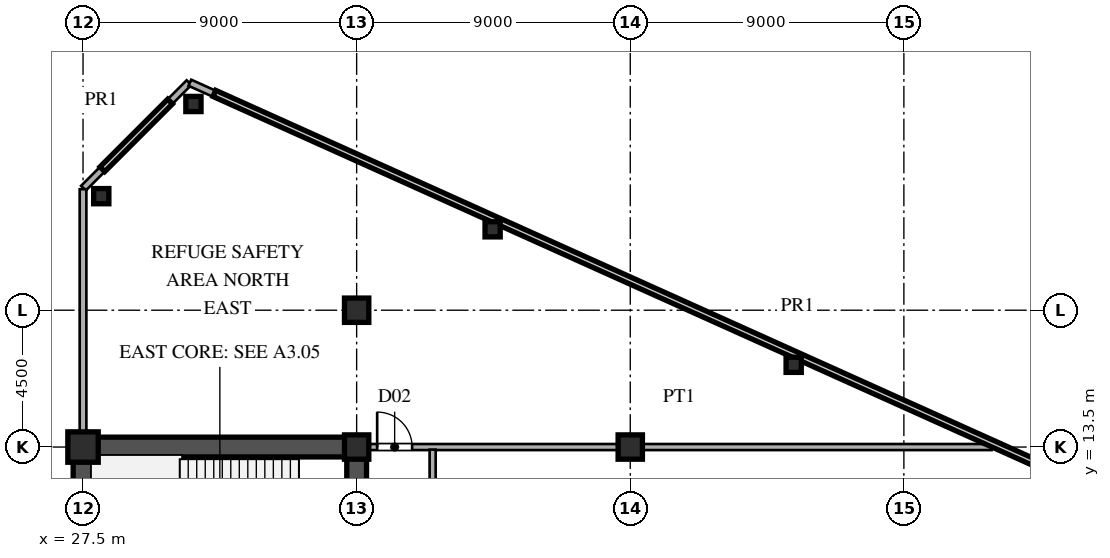
"""IFC4 building model, lengths in metres.
Left out: names, types, materials, properties, quantities, classifications, styles, units other than length and angle.
Written with IfcOpenShell. Run it as: python <this file> out.ifc"""

import sys

from ifc_helpers import new_model, si_unit, direction, frame, frame_2d, origin, origin_2d, place, context, subcontext, project, spatial, rectangle, hollow_rectangle, i_section, extrude, source, transform, mapped, element, fill, save


model = new_model("IFC4")
c1 = context("Model", 3, precision=1e-05, world=origin(), true_north=direction((0.0, 1.0)))
c2 = subcontext(c1, "Body", "Model", "MODEL_VIEW")
j1 = project(units=[si_unit("LENGTHUNIT", "METRE"), si_unit("PLANEANGLEUNIT", "RADIAN")], contexts=[c1])
p1 = place(None, origin())
s1 = spatial("IfcSite", under=j1, at=p1, CompositionType="ELEMENT")
p2 = place(p1, origin())
s2 = spatial("IfcBuilding", under=s1, at=p2, CompositionType="ELEMENT")
p3 = place(p2, frame((0.0, 0.0, 87.3)))
s3 = spatial("IfcBuildingStorey", under=s2, at=p3, CompositionType="ELEMENT", Elevation=87.3)
m1 = source(origin(), c2, "Body", "SweptSolid", [
    extrude(hollow_rectangle(XDim=1.0, YDim=1.0, WallThickness=0.042, at=origin_2d()), origin(), (0.0, 0.0, 1.0), 5.1),
])
p4 = place(p3, frame((27.5, 13.5, 0.0), z_axis=(0.0, 0.0, 1.0), x_axis=(1.0, 0.0, 0.0)))
e1 = element("IfcColumn", 1, at=p4, inside=s3, PredefinedType="COLUMN", context=c2, shape_type="MappedRepresentation", body=[
    mapped(m1, transform((0.0, 0.0, 0.0), scale=1.0)),
])
m2 = source(origin(), c2, "Body", "SweptSolid", [
    extrude(i_section(OverallWidth=0.8, OverallDepth=0.8, WebThickness=0.032, FlangeThickness=0.05, at=origin_2d()), origin(), (0.0, 0.0, 1.0), 5.1),
])
for number, where, z_axis, x_axis in (
    (2, (36.5, 13.5, 0.0), (0.0, 0.0, 1.0), (1.0, 0.0, 0.0)),
    (3, (36.5, 18.0, 0.0), (0.0, 0.0, 1.0), (1.0, 0.0, 0.0)),
    (4, (45.5, 13.5, 0.0), (0.0, 0.0, 1.0), (1.0, 0.0, 0.0)),
):
    element("IfcColumn", number, at=place(p3, frame(where, z_axis=z_axis, x_axis=x_axis)), inside=s3, PredefinedType="COLUMN", context=c2, shape_type="MappedRepresentation", body=[
        mapped(m2, transform((0.0, 0.0, 0.0), scale=1.0)),
    ])
m3 = source(origin(), c2, "Body", "SweptSolid", [
    extrude(hollow_rectangle(XDim=0.5, YDim=0.5, WallThickness=0.02, at=origin_2d()), origin(), (0.0, 0.0, 1.0), 5.1),
])
for number, where, z_axis, x_axis in (
    (5, (31.131, 24.783, 0.0), (0.0, 0.0, 1.0), (1.0, 0.0, 0.0)),
    (6, (28.1, 21.751, 0.0), (0.0, 0.0, 1.0), (1.0, 0.0, 0.0)),
    (7, (40.973, 20.661, 0.0), (0.0, 0.0, 1.0), (1.0, 0.0, 0.0)),
    (8, (50.875, 16.205, 0.0), (0.0, 0.0, 1.0), (1.0, 0.0, 0.0)),
):
    element("IfcColumn", number, at=place(p3, frame(where, z_axis=z_axis, x_axis=x_axis)), inside=s3, PredefinedType="COLUMN", context=c2, shape_type="MappedRepresentation", body=[
        mapped(m3, transform((0.0, 0.0, 0.0), scale=1.0)),
    ])
p5 = place(p3, frame((70.982, 7.508, 0.0), z_axis=(0.0, 0.0, 1.0), x_axis=(-0.911922547569, 0.410362360889, 0.0)))
e9 = element("IfcWall", 9, at=p5, inside=s3, PredefinedType="PARAPET", context=c2, shape_type="SweptSolid", body=[
    extrude(rectangle(XDim=43.823, YDim=0.22, at=frame_2d((21.912, 0.0))), origin(), (0.0, 0.0, 1.0), 1.25),
])
p6 = place(p3, frame((30.986, 25.486, 0.0), z_axis=(0.0, 0.0, 1.0), x_axis=(-0.707106781187, -0.707106781187, 0.0)))
e10 = element("IfcWall", 10, at=p6, inside=s3, PredefinedType="PARAPET", context=c2, shape_type="SweptSolid", body=[
    extrude(rectangle(XDim=4.91, YDim=0.22, at=frame_2d((2.455, 0.0))), origin(), (0.0, 0.0, 1.0), 1.25),
])
p7 = place(p3, frame((27.5, 13.52, 0.0), z_axis=(0.0, 0.0, 1.0), x_axis=(0.0, 1.0, 0.0)))
e11 = element("IfcWall", 11, at=p7, inside=s3, PredefinedType="PARAPET", context=c2, shape_type="SweptSolid", body=[
    extrude(rectangle(XDim=8.46, YDim=0.22, at=frame_2d((4.23, 0.0))), origin(), (0.0, 0.0, 1.0), 1.25),
])
p8 = place(p3, frame((27.5, 1.3, 0.0), z_axis=(0.0, 0.0, 1.0), x_axis=(0.0, 1.0, 0.0)))
e12 = element("IfcWall", 12, at=p8, inside=s3, PredefinedType="SHEAR", context=c2, shape_type="SweptSolid", body=[
    extrude(rectangle(XDim=12.2, YDim=0.65, at=frame_2d((6.1, 0.0))), origin(), (0.0, 0.0, 1.0), 4.88),
])
p9 = place(p3, frame((27.5, 13.5, 0.0), z_axis=(0.0, 0.0, 1.0), x_axis=(1.0, 0.0, 0.0)))
e13 = element("IfcWall", 13, at=p9, inside=s3, PredefinedType="SHEAR", context=c2, shape_type="SweptSolid", body=[
    extrude(rectangle(XDim=9.0, YDim=0.65, at=frame_2d((4.5, 0.0))), origin(), (0.0, 0.0, 1.0), 4.88),
])
p10 = place(p3, frame((36.5, 8.2, 0.0), z_axis=(0.0, 0.0, 1.0), x_axis=(0.0, 1.0, 0.0)))
e14 = element("IfcWall", 14, at=p10, inside=s3, PredefinedType="SHEAR", context=c2, shape_type="SweptSolid", body=[
    extrude(rectangle(XDim=5.45, YDim=0.65, at=frame_2d((2.725, 0.0))), origin(), (0.0, 0.0, 1.0), 4.88),
])
p11 = place(p10, frame((0.245, 0.0, 0.0)))
e15 = element("IfcOpeningElement", 15, at=p11, cuts=e14, PredefinedType="OPENING", context=c2, shape_type="SweptSolid", body=[
    extrude(rectangle(XDim=0.95, YDim=2.15, at=frame_2d((0.475, 1.075))), frame((0.0, 0.335, 0.0), z_axis=(0.0, -1.0, 0.0), x_axis=(1.0, 0.0, 0.0)), (0.0, 0.0, 1.0), 0.67),
])
p12 = place(p3, frame((36.83, 13.5, 0.0), z_axis=(0.0, 0.0, 1.0), x_axis=(1.0, 0.0, 0.0)))
e16 = element("IfcWall", 16, at=p12, inside=s3, PredefinedType="PARTITIONING", context=c2, shape_type="SweptSolid", body=[
    extrude(rectangle(XDim=8.69, YDim=0.2, at=frame_2d((4.345, 0.0))), origin(), (0.0, 0.0, 1.0), 4.18),
])
p13 = place(p12, frame((0.345, 0.0, 0.0)))
e17 = element("IfcOpeningElement", 17, at=p13, cuts=e16, PredefinedType="OPENING", context=c2, shape_type="SweptSolid", body=[
    extrude(rectangle(XDim=1.15, YDim=2.2, at=frame_2d((0.575, 1.1))), frame((0.0, 0.11, 0.0), z_axis=(0.0, -1.0, 0.0), x_axis=(1.0, 0.0, 0.0)), (0.0, 0.0, 1.0), 0.22),
])
p14 = place(p3, frame((45.52, 13.5, 0.0), z_axis=(0.0, 0.0, 1.0), x_axis=(1.0, 0.0, 0.0)))
e18 = element("IfcWall", 18, at=p14, inside=s3, PredefinedType="PARTITIONING", context=c2, shape_type="SweptSolid", body=[
    extrude(rectangle(XDim=11.866, YDim=0.2, at=frame_2d((5.933, 0.0))), origin(), (0.0, 0.0, 1.0), 4.88),
])
p15 = place(p3, frame((39.0, -13.415, 0.0), z_axis=(0.0, 0.0, 1.0), x_axis=(0.0, 1.0, 0.0)))
e19 = element("IfcWall", 19, at=p15, inside=s3, PredefinedType="PARTITIONING", context=c2, shape_type="SweptSolid", body=[
    extrude(rectangle(XDim=26.83, YDim=0.2, at=frame_2d((13.415, 0.0))), origin(), (0.0, 0.0, 1.0), 4.88),
])
p16 = place(p15, frame((4.04, 0.0, 0.0)))
e20 = element("IfcOpeningElement", 20, at=p16, cuts=e19, PredefinedType="OPENING", context=c2, shape_type="SweptSolid", body=[
    extrude(rectangle(XDim=1.15, YDim=2.2, at=frame_2d((0.575, 1.1))), frame((0.0, 0.11, 0.0), z_axis=(0.0, -1.0, 0.0), x_axis=(1.0, 0.0, 0.0)), (0.0, 0.0, 1.0), 0.22),
])
p17 = place(p15, frame((11.34, 0.0, 0.0)))
e21 = element("IfcOpeningElement", 21, at=p17, cuts=e19, PredefinedType="OPENING", context=c2, shape_type="SweptSolid", body=[
    extrude(rectangle(XDim=1.15, YDim=2.2, at=frame_2d((0.575, 1.1))), frame((0.0, 0.11, 0.0), z_axis=(0.0, -1.0, 0.0), x_axis=(1.0, 0.0, 0.0)), (0.0, 0.0, 1.0), 0.22),
])
p18 = place(p15, frame((17.59, 0.0, 0.0)))
e22 = element("IfcOpeningElement", 22, at=p18, cuts=e19, PredefinedType="OPENING", context=c2, shape_type="SweptSolid", body=[
    extrude(rectangle(XDim=1.15, YDim=2.2, at=frame_2d((0.575, 1.1))), frame((0.0, 0.11, 0.0), z_axis=(0.0, -1.0, 0.0), x_axis=(1.0, 0.0, 0.0)), (0.0, 0.0, 1.0), 0.22),
])
p19 = place(p15, frame((23.39, 0.0, 0.0)))
e23 = element("IfcOpeningElement", 23, at=p19, cuts=e19, PredefinedType="OPENING", context=c2, shape_type="SweptSolid", body=[
    extrude(rectangle(XDim=1.15, YDim=2.2, at=frame_2d((0.575, 1.1))), frame((0.0, 0.11, 0.0), z_axis=(0.0, -1.0, 0.0), x_axis=(1.0, 0.0, 0.0)), (0.0, 0.0, 1.0), 0.22),
])
m4 = source(origin(), c2, "Body", "SweptSolid", [
    extrude(rectangle(XDim=1.15, YDim=2.2, at=frame_2d((0.575, 1.1))), frame((0.0, 0.025, 0.0), z_axis=(0.0, -1.0, 0.0), x_axis=(1.0, 0.0, 0.0)), (0.0, 0.0, 1.0), 0.05),
])
p20 = place(p13, origin())
e24 = element("IfcDoor", 24, at=p20, inside=s3, OperationType="SINGLE_SWING_LEFT", PredefinedType="DOOR", context=c2, shape_type="MappedRepresentation", body=[
    mapped(m4, transform((0.0, 0.0, 0.0), scale=1.0)),
])
fill(e17, e24)
save(model, sys.argv[1])
